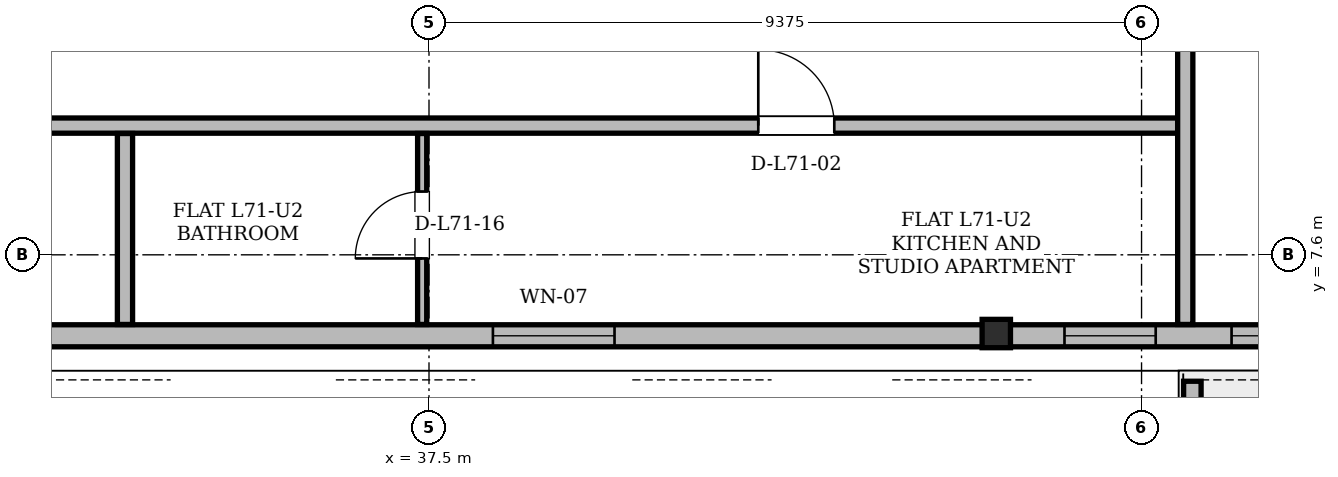
"""IFC4 building model, lengths in metres.
Left out: names, types, materials, properties, quantities, classifications, styles, units other than length and angle.
Written with IfcOpenShell. Run it as: python <this file> out.ifc"""

import sys

from ifc_helpers import new_model, si_unit, direction, frame, frame_2d, origin, origin_2d, place, context, subcontext, project, spatial, polyline, rectangle, i_section, outline, extrude, element, fill, save


model = new_model("IFC4")
c1 = context("Model", 3, precision=1e-05, world=origin(), true_north=direction((0.0, 1.0)))
c2 = subcontext(c1, "Body", "Model", "MODEL_VIEW")
j1 = project(units=[si_unit("LENGTHUNIT", "METRE"), si_unit("PLANEANGLEUNIT", "RADIAN")], contexts=[c1])
p1 = place(None, origin())
s1 = spatial("IfcSite", under=j1, at=p1, CompositionType="ELEMENT")
p2 = place(p1, origin())
s2 = spatial("IfcBuilding", under=s1, at=p2, CompositionType="ELEMENT")
p3 = place(p2, frame((0.0, 0.0, 269.4)))
s3 = spatial("IfcBuildingStorey", under=s2, at=p3, CompositionType="ELEMENT", Elevation=269.4)
p4 = place(p3, frame((44.959, 6.535, 0.005), z_axis=(0.002384104632, 0.015245721728, 0.999880934919), x_axis=(-0.987992646494, 0.154500907682, 0.0)))
e1 = element("IfcColumn", 1, at=p4, inside=s3, PredefinedType="COLUMN", context=c2, shape_type="SweptSolid", body=[
    extrude(i_section(OverallWidth=0.373, OverallDepth=0.373, WebThickness=0.016, FlangeThickness=0.026, at=origin_2d()), origin(), (0.0, 0.0, 1.0), 3.891),
])
p5 = place(p3, frame((18.852, 6.535, 0.0), z_axis=(0.0, 0.0, 1.0), x_axis=(1.0, 0.0, 0.0)))
e2 = element("IfcWall", 2, at=p5, inside=s3, PredefinedType="SOLIDWALL", context=c2, shape_type="SweptSolid", body=[
    extrude(rectangle(XDim=37.296, YDim=0.29, at=frame_2d((18.648, 0.0))), origin(), (0.0, 0.0, 1.0), 3.058),
])
p6 = place(p5, frame((8.034, 0.0, 0.0)))
e3 = element("IfcOpeningElement", 3, at=p6, cuts=e2, PredefinedType="OPENING", context=c2, shape_type="SweptSolid", body=[
    extrude(rectangle(XDim=1.5, YDim=2.2, at=frame_2d((0.75, 1.1))), frame((0.0, 0.145, 0.0), z_axis=(0.0, -1.0, 0.0), x_axis=(1.0, 0.0, 0.0)), (0.0, 0.0, 1.0), 0.29),
])
p7 = place(p5, frame((32.156, 0.0, 0.0)))
e4 = element("IfcOpeningElement", 4, at=p7, cuts=e2, PredefinedType="OPENING", context=c2, shape_type="SweptSolid", body=[
    extrude(rectangle(XDim=1.5, YDim=2.2, at=frame_2d((0.75, 1.1))), frame((0.0, 0.145, 0.0), z_axis=(0.0, -1.0, 0.0), x_axis=(1.0, 0.0, 0.0)), (0.0, 0.0, 1.0), 0.29),
])
p8 = place(p5, frame((4.146, 0.0, 0.85)))
e5 = element("IfcOpeningElement", 5, at=p8, cuts=e2, PredefinedType="OPENING", context=c2, shape_type="SweptSolid", body=[
    extrude(rectangle(XDim=1.2, YDim=1.48, at=frame_2d((0.6, 0.74))), frame((0.0, 0.145, 0.0), z_axis=(0.0, -1.0, 0.0), x_axis=(1.0, 0.0, 0.0)), (0.0, 0.0, 1.0), 0.29),
])
p9 = place(p5, frame((11.782, 0.0, 0.85)))
e6 = element("IfcOpeningElement", 6, at=p9, cuts=e2, PredefinedType="OPENING", context=c2, shape_type="SweptSolid", body=[
    extrude(rectangle(XDim=1.2, YDim=1.48, at=frame_2d((0.6, 0.74))), frame((0.0, 0.145, 0.0), z_axis=(0.0, -1.0, 0.0), x_axis=(1.0, 0.0, 0.0)), (0.0, 0.0, 1.0), 0.29),
])
p10 = place(p5, frame((0.887, 0.0, 0.85)))
e7 = element("IfcOpeningElement", 7, at=p10, cuts=e2, PredefinedType="OPENING", context=c2, shape_type="SweptSolid", body=[
    extrude(rectangle(XDim=1.2, YDim=1.48, at=frame_2d((0.6, 0.74))), frame((0.0, 0.145, 0.0), z_axis=(0.0, -1.0, 0.0), x_axis=(1.0, 0.0, 0.0)), (0.0, 0.0, 1.0), 0.29),
])
p11 = place(p5, frame((19.489, 0.0, 0.85)))
e8 = element("IfcOpeningElement", 8, at=p11, cuts=e2, PredefinedType="OPENING", context=c2, shape_type="SweptSolid", body=[
    extrude(rectangle(XDim=1.6, YDim=1.7, at=frame_2d((0.8, 0.85))), frame((0.0, 0.145, 0.0), z_axis=(0.0, -1.0, 0.0), x_axis=(1.0, 0.0, 0.0)), (0.0, 0.0, 1.0), 0.29),
])
p12 = place(p5, frame((27.009, 0.0, 0.85)))
e9 = element("IfcOpeningElement", 9, at=p12, cuts=e2, PredefinedType="OPENING", context=c2, shape_type="SweptSolid", body=[
    extrude(rectangle(XDim=1.2, YDim=1.48, at=frame_2d((0.6, 0.74))), frame((0.0, 0.145, 0.0), z_axis=(0.0, -1.0, 0.0), x_axis=(1.0, 0.0, 0.0)), (0.0, 0.0, 1.0), 0.29),
])
p13 = place(p5, frame((29.207, 0.0, 0.85)))
e10 = element("IfcOpeningElement", 10, at=p13, cuts=e2, PredefinedType="OPENING", context=c2, shape_type="SweptSolid", body=[
    extrude(rectangle(XDim=1.2, YDim=1.48, at=frame_2d((0.6, 0.74))), frame((0.0, 0.145, 0.0), z_axis=(0.0, -1.0, 0.0), x_axis=(1.0, 0.0, 0.0)), (0.0, 0.0, 1.0), 0.29),
])
p14 = place(p5, frame((35.192, 0.0, 0.85)))
e11 = element("IfcOpeningElement", 11, at=p14, cuts=e2, PredefinedType="OPENING", context=c2, shape_type="SweptSolid", body=[
    extrude(rectangle(XDim=1.2, YDim=1.48, at=frame_2d((0.6, 0.74))), frame((0.0, 0.145, 0.0), z_axis=(0.0, -1.0, 0.0), x_axis=(1.0, 0.0, 0.0)), (0.0, 0.0, 1.0), 0.29),
])
p15 = place(p3, frame((47.543, 5.937, 0.0), z_axis=(0.0, 0.0, 1.0), x_axis=(0.0, -1.0, 0.0)))
e12 = element("IfcWall", 12, at=p15, inside=s3, PredefinedType="PARAPET", context=c2, shape_type="SweptSolid", body=[
    extrude(outline(polyline([(0.0, 0.0), (2.042, 0.0), (2.042, 1.1), (0.0, 1.32), (0.0, 0.0)])), frame((0.0, 0.115, 0.0), z_axis=(0.0, -1.0, 0.0), x_axis=(1.0, 0.0, 0.0)), (0.0, 0.0, 1.0), 0.23),
])
p16 = place(p3, frame((25.6, 9.3, 0.0), z_axis=(0.0, 0.0, 1.0), x_axis=(1.0, 0.0, 0.0)))
e13 = element("IfcWall", 13, at=p16, inside=s3, PredefinedType="PARTITIONING", context=c2, shape_type="SweptSolid", body=[
    extrude(rectangle(XDim=21.85, YDim=0.2, at=frame_2d((10.925, 0.0))), origin(), (0.0, 0.0, 1.0), 3.68),
])
p17 = place(p16, frame((3.841, 0.0, 0.0)))
e14 = element("IfcOpeningElement", 14, at=p17, cuts=e13, PredefinedType="OPENING", context=c2, shape_type="SweptSolid", body=[
    extrude(rectangle(XDim=1.0, YDim=2.18, at=frame_2d((0.5, 1.09))), frame((0.0, 0.1, 0.0), z_axis=(0.0, -1.0, 0.0), x_axis=(1.0, 0.0, 0.0)), (0.0, 0.0, 1.0), 0.2),
])
p18 = place(p16, frame((16.232, 0.0, 0.0)))
e15 = element("IfcOpeningElement", 15, at=p18, cuts=e13, PredefinedType="OPENING", context=c2, shape_type="SweptSolid", body=[
    extrude(rectangle(XDim=1.0, YDim=2.18, at=frame_2d((0.5, 1.09))), frame((0.0, 0.1, 0.0), z_axis=(0.0, -1.0, 0.0), x_axis=(1.0, 0.0, 0.0)), (0.0, 0.0, 1.0), 0.2),
])
p19 = place(p3, frame((33.5, 6.684, 0.0), z_axis=(0.0, 0.0, 1.0), x_axis=(0.0, 1.0, 0.0)))
e16 = element("IfcWall", 16, at=p19, inside=s3, PredefinedType="PARTITIONING", context=c2, shape_type="SweptSolid", body=[
    extrude(rectangle(XDim=2.512, YDim=0.2, at=frame_2d((1.256, 0.0))), origin(), (0.0, 0.0, 1.0), 3.68),
])
p20 = place(p3, frame((37.41, 6.684, 0.0), z_axis=(0.0, 0.0, 1.0), x_axis=(0.0, 1.0, 0.0)))
e17 = element("IfcWall", 17, at=p20, inside=s3, PredefinedType="PARTITIONING", context=c2, shape_type="SweptSolid", body=[
    extrude(rectangle(XDim=2.512, YDim=0.12, at=frame_2d((1.256, 0.0))), origin(), (0.0, 0.0, 1.0), 3.68),
])
p21 = place(p20, frame((0.869, 0.0, 0.0)))
e18 = element("IfcOpeningElement", 18, at=p21, cuts=e17, PredefinedType="OPENING", context=c2, shape_type="SweptSolid", body=[
    extrude(rectangle(XDim=0.88, YDim=2.08, at=frame_2d((0.44, 1.04))), frame((0.0, 0.06, 0.0), z_axis=(0.0, -1.0, 0.0), x_axis=(1.0, 0.0, 0.0)), (0.0, 0.0, 1.0), 0.12),
])
p22 = place(p3, frame((47.45, 6.684, 0.0), z_axis=(0.0, 0.0, 1.0), x_axis=(0.0, 1.0, 0.0)))
e19 = element("IfcWall", 19, at=p22, inside=s3, PredefinedType="PARTITIONING", context=c2, shape_type="SweptSolid", body=[
    extrude(rectangle(XDim=23.015, YDim=0.2, at=frame_2d((11.507, 0.0))), origin(), (0.0, 0.0, 1.0), 3.058),
])
p23 = place(p22, frame((7.212, 0.0, 0.0)))
e20 = element("IfcOpeningElement", 20, at=p23, cuts=e19, PredefinedType="OPENING", context=c2, shape_type="SweptSolid", body=[
    extrude(rectangle(XDim=1.0, YDim=2.18, at=frame_2d((0.5, 1.09))), frame((0.0, 0.1, 0.0), z_axis=(0.0, -1.0, 0.0), x_axis=(1.0, 0.0, 0.0)), (0.0, 0.0, 1.0), 0.2),
])
p24 = place(p22, frame((15.198, 0.0, 0.0)))
e21 = element("IfcOpeningElement", 21, at=p24, cuts=e19, PredefinedType="OPENING", context=c2, shape_type="SweptSolid", body=[
    extrude(rectangle(XDim=1.0, YDim=2.18, at=frame_2d((0.5, 1.09))), frame((0.0, 0.1, 0.0), z_axis=(0.0, -1.0, 0.0), x_axis=(1.0, 0.0, 0.0)), (0.0, 0.0, 1.0), 0.2),
])
p25 = place(p11, origin())
e22 = element("IfcWindow", 22, at=p25, inside=s3, PartitioningType="SINGLE_PANEL", PredefinedType="WINDOW", context=c2, shape_type="SweptSolid", body=[
    extrude(rectangle(XDim=1.6, YDim=1.7, at=frame_2d((0.8, 0.85))), frame((0.0, 0.03, 0.0), z_axis=(0.0, -1.0, 0.0), x_axis=(1.0, 0.0, 0.0)), (0.0, 0.0, 1.0), 0.06),
])
fill(e8, e22)
p26 = place(p12, origin())
e23 = element("IfcWindow", 23, at=p26, inside=s3, PartitioningType="SINGLE_PANEL", PredefinedType="WINDOW", context=c2, shape_type="SweptSolid", body=[
    extrude(rectangle(XDim=1.2, YDim=1.48, at=frame_2d((0.6, 0.74))), frame((0.0, 0.03, 0.0), z_axis=(0.0, -1.0, 0.0), x_axis=(1.0, 0.0, 0.0)), (0.0, 0.0, 1.0), 0.06),
])
fill(e9, e23)
p27 = place(p13, origin())
e24 = element("IfcWindow", 24, at=p27, inside=s3, PartitioningType="SINGLE_PANEL", PredefinedType="WINDOW", context=c2, shape_type="SweptSolid", body=[
    extrude(rectangle(XDim=1.2, YDim=1.48, at=frame_2d((0.6, 0.74))), frame((0.0, 0.03, 0.0), z_axis=(0.0, -1.0, 0.0), x_axis=(1.0, 0.0, 0.0)), (0.0, 0.0, 1.0), 0.06),
])
fill(e10, e24)
p28 = place(p18, origin())
e25 = element("IfcDoor", 25, at=p28, inside=s3, OperationType="SINGLE_SWING_LEFT", PredefinedType="DOOR", context=c2, shape_type="SweptSolid", body=[
    extrude(rectangle(XDim=1.0, YDim=2.18, at=frame_2d((0.5, 1.09))), frame((0.0, 0.025, 0.0), z_axis=(0.0, -1.0, 0.0), x_axis=(1.0, 0.0, 0.0)), (0.0, 0.0, 1.0), 0.05),
])
fill(e15, e25)
p29 = place(p21, origin())
e26 = element("IfcDoor", 26, at=p29, inside=s3, OperationType="SINGLE_SWING_LEFT", PredefinedType="DOOR", context=c2, shape_type="SweptSolid", body=[
    extrude(rectangle(XDim=0.88, YDim=2.08, at=frame_2d((0.44, 1.04))), frame((0.0, 0.025, 0.0), z_axis=(0.0, -1.0, 0.0), x_axis=(1.0, 0.0, 0.0)), (0.0, 0.0, 1.0), 0.05),
])
fill(e18, e26)
save(model, sys.argv[1])
